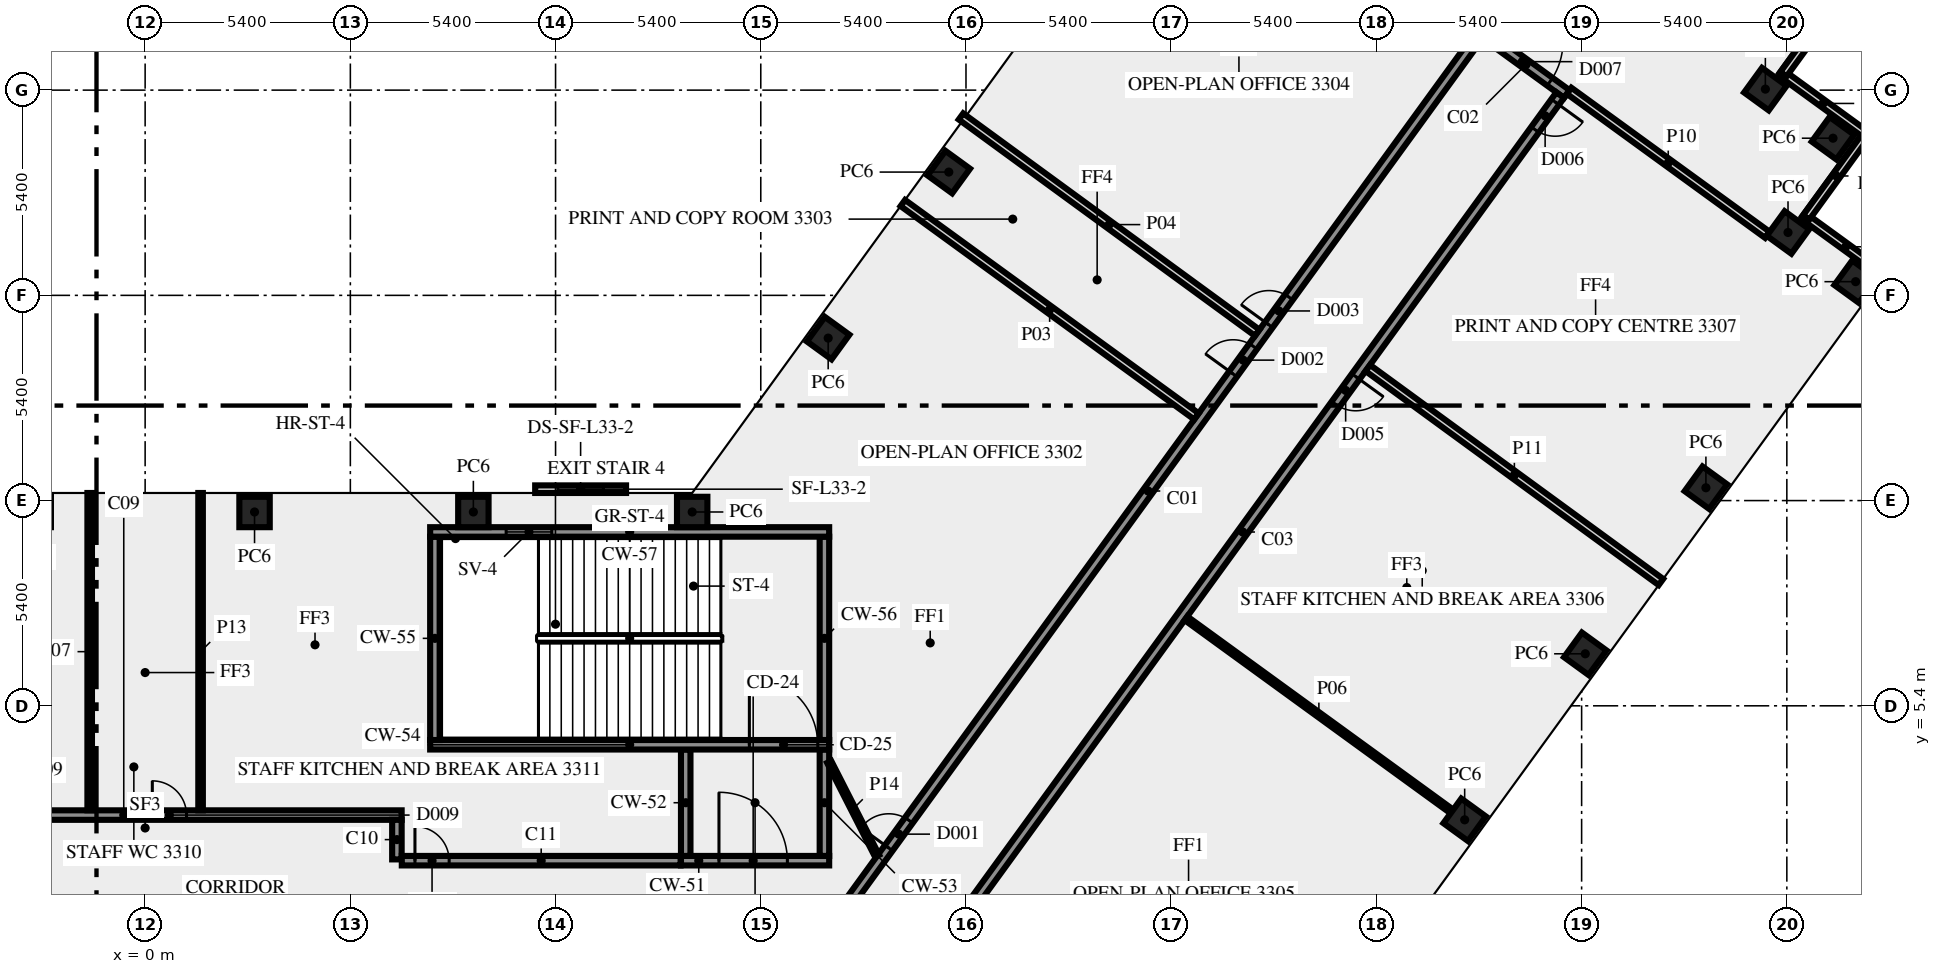
"""IFC4 building model, lengths in metres.
Left out: names, types, materials, properties, quantities, classifications, styles, units other than length and angle.
Written with IfcOpenShell. Run it as: python <this file> out.ifc"""

import sys

from ifc_helpers import new_model, si_unit, direction, frame, frame_2d, origin, origin_2d, place, context, subcontext, project, spatial, rectangle, extrude, element, fill, save


model = new_model("IFC4")
c1 = context("Model", 3, precision=1e-05, world=origin(), true_north=direction((0.0, 1.0)))
c2 = subcontext(c1, "Body", "Model", "MODEL_VIEW")
j1 = project(units=[si_unit("LENGTHUNIT", "METRE"), si_unit("PLANEANGLEUNIT", "RADIAN")], contexts=[c1])
p1 = place(None, origin())
s1 = spatial("IfcSite", under=j1, at=p1, CompositionType="ELEMENT")
p2 = place(p1, origin())
s2 = spatial("IfcBuilding", under=s1, at=p2, CompositionType="ELEMENT")
p3 = place(p2, frame((0.0, 0.0, 144.0)))
s3 = spatial("IfcBuildingStorey", under=s2, at=p3, CompositionType="ELEMENT", Elevation=144.0)
for number, where, z_axis, x_axis in (
    (1, (34.722, 2.4, 0.0), (0.0, 0.0, 1.0), (0.588, 0.809, 0.0)),
    (2, (37.896, 6.769, 0.0), (0.0, 0.0, 1.0), (0.588, 0.809, 0.0)),
    (3, (41.07, 11.137, 0.0), (0.0, 0.0, 1.0), (0.588, 0.809, 0.0)),
    (4, (45.01, 16.56, 0.0), (0.0, 0.0, 1.0), (0.588, 0.809, 0.0)),
    (5, (43.231, 17.854, 0.0), (0.0, 0.0, 1.0), (0.588, 0.809, 0.0)),
    (6, (44.415, 20.335, 0.0), (0.0, 0.0, 1.0), (0.588, 0.809, 0.0)),
    (7, (42.635, 21.626, 0.0), (0.0, 0.0, 1.0), (-0.809, 0.588, 0.0)),
    (8, (21.147, 19.444, 0.0), (0.0, 0.0, 1.0), (-0.588, -0.809, 0.0)),
    (9, (17.974, 15.075, 0.0), (0.0, 0.0, 1.0), (-0.588, -0.809, 0.0)),
    (10, (14.395, 10.5, 0.0), (0.0, 0.0, 1.0), (-1.0, 0.0, 0.0)),
    (11, (8.637, 10.5, 0.0), (0.0, 0.0, 1.0), (-1.0, 0.0, 0.0)),
    (12, (2.879, 10.5, 0.0), (0.0, 0.0, 1.0), (-1.0, 0.0, 0.0)),
):
    element("IfcColumn", number, at=place(p3, frame(where, z_axis=z_axis, x_axis=x_axis)), inside=s3, PredefinedType="COLUMN", context=c2, shape_type="SweptSolid", body=[
        extrude(rectangle(XDim=0.8, YDim=0.8, at=origin_2d()), origin(), (0.0, 0.0, 1.0), 3.65),
    ])
for number, where, z_axis, x_axis in (
    (13, (45.842, 16.685, 0.0), (0.0, 0.0, 1.0), (-0.809, 0.588, 0.0)),
    (14, (43.709, 18.249, 0.0), (0.0, 0.0, 1.0), (0.588, 0.809, 0.0)),
    (15, (45.245, 20.456, 0.0), (0.0, 0.0, 1.0), (-0.809, 0.588, 0.0)),
    (16, (43.113, 22.02, 0.0), (0.0, 0.0, 1.0), (0.588, 0.809, 0.0)),
):
    element("IfcWall", number, at=place(p3, frame(where, z_axis=z_axis, x_axis=x_axis)), inside=s3, PredefinedType="SOLIDWALL", context=c2, shape_type="SweptSolid", body=[
        extrude(rectangle(XDim=2.7, YDim=0.2, at=frame_2d((1.35, 0.0))), origin(), (0.0, 0.0, 1.0), 3.65),
    ])
p4 = place(p3, frame((12.655, 11.1, 0.0), z_axis=(0.0, 0.0, 1.0), x_axis=(-1.0, 0.0, 0.0)))
e17 = element("IfcWall", 17, at=p4, inside=s3, PredefinedType="SOLIDWALL", context=c2, shape_type="SweptSolid", body=[
    extrude(rectangle(XDim=2.392, YDim=0.2, at=frame_2d((1.196, 0.0))), origin(), (0.0, 0.0, 1.0), 3.65),
])
p5 = place(p4, frame((0.596, 0.0, 1.0)))
e18 = element("IfcOpeningElement", 18, at=p5, cuts=e17, PredefinedType="OPENING", context=c2, shape_type="SweptSolid", body=[
    extrude(rectangle(XDim=1.2, YDim=1.2, at=frame_2d((0.6, 0.6))), frame((0.0, 0.11, 0.0), z_axis=(0.0, -1.0, 0.0), x_axis=(1.0, 0.0, 0.0)), (0.0, 0.0, 1.0), 0.22),
])
p6 = place(p3, frame((14.1, 1.325, 0.0), z_axis=(0.0, 0.0, 1.0), x_axis=(1.0, 0.0, 0.0)))
e19 = element("IfcWall", 19, at=p6, inside=s3, PredefinedType="SHEAR", context=c2, shape_type="SweptSolid", body=[
    extrude(rectangle(XDim=3.9, YDim=0.25, at=frame_2d((1.95, 0.0))), origin(), (0.0, 0.0, 1.0), 3.65),
])
p7 = place(p6, frame((1.0, 0.0, 0.0)))
e20 = element("IfcOpeningElement", 20, at=p7, cuts=e19, PredefinedType="OPENING", context=c2, shape_type="SweptSolid", body=[
    extrude(rectangle(XDim=1.8, YDim=2.1, at=frame_2d((0.9, 1.05))), frame((0.0, 0.135, 0.0), z_axis=(0.0, -1.0, 0.0), x_axis=(1.0, 0.0, 0.0)), (0.0, 0.0, 1.0), 0.27),
])
for number, where, z_axis, x_axis in (
    (21, (14.225, 1.45, 0.0), (0.0, 0.0, 1.0), (0.0, 1.0, 0.0)),
    (22, (17.875, 1.45, 0.0), (0.0, 0.0, 1.0), (0.0, 1.0, 0.0)),
):
    element("IfcWall", number, at=place(p3, frame(where, z_axis=z_axis, x_axis=x_axis)), inside=s3, PredefinedType="SHEAR", context=c2, shape_type="SweptSolid", body=[
        extrude(rectangle(XDim=2.8, YDim=0.25, at=frame_2d((1.4, 0.0))), origin(), (0.0, 0.0, 1.0), 3.65),
    ])
p8 = place(p3, frame((7.5, 4.375, 0.0), z_axis=(0.0, 0.0, 1.0), x_axis=(1.0, 0.0, 0.0)))
e23 = element("IfcWall", 23, at=p8, inside=s3, PredefinedType="SHEAR", context=c2, shape_type="SweptSolid", body=[
    extrude(rectangle(XDim=10.5, YDim=0.25, at=frame_2d((5.25, 0.0))), origin(), (0.0, 0.0, 1.0), 3.65),
])
p9 = place(p8, frame((8.4, 0.0, 0.0)))
e24 = element("IfcOpeningElement", 24, at=p9, cuts=e23, PredefinedType="OPENING", context=c2, shape_type="SweptSolid", body=[
    extrude(rectangle(XDim=1.8, YDim=2.1, at=frame_2d((0.9, 1.05))), frame((0.0, 0.135, 0.0), z_axis=(0.0, -1.0, 0.0), x_axis=(1.0, 0.0, 0.0)), (0.0, 0.0, 1.0), 0.27),
])
for number, where, z_axis, x_axis in (
    (25, (7.625, 4.5, 0.0), (0.0, 0.0, 1.0), (0.0, 1.0, 0.0)),
    (26, (17.875, 4.5, 0.0), (0.0, 0.0, 1.0), (0.0, 1.0, 0.0)),
):
    element("IfcWall", number, at=place(p3, frame(where, z_axis=z_axis, x_axis=x_axis)), inside=s3, PredefinedType="SHEAR", context=c2, shape_type="SweptSolid", body=[
        extrude(rectangle(XDim=5.35, YDim=0.25, at=frame_2d((2.675, 0.0))), origin(), (0.0, 0.0, 1.0), 3.65),
    ])
p10 = place(p3, frame((7.5, 9.975, 0.0), z_axis=(0.0, 0.0, 1.0), x_axis=(1.0, 0.0, 0.0)))
e27 = element("IfcWall", 27, at=p10, inside=s3, PredefinedType="SHEAR", context=c2, shape_type="SweptSolid", body=[
    extrude(rectangle(XDim=10.5, YDim=0.25, at=frame_2d((5.25, 0.0))), origin(), (0.0, 0.0, 1.0), 3.65),
])
p11 = place(p10, frame((2.0, 0.0, 1.0)))
e28 = element("IfcOpeningElement", 28, at=p11, cuts=e27, PredefinedType="OPENING", context=c2, shape_type="SweptSolid", body=[
    extrude(rectangle(XDim=1.2, YDim=1.2, at=frame_2d((0.6, 0.6))), frame((0.0, 0.135, 0.0), z_axis=(0.0, -1.0, 0.0), x_axis=(1.0, 0.0, 0.0)), (0.0, 0.0, 1.0), 0.27),
])
p12 = place(p3, frame((17.545, -1.125, 0.0), z_axis=(0.0, 0.0, 1.0), x_axis=(0.587786330937, 0.809016210693, 0.0)))
e29 = element("IfcWall", 29, at=p12, inside=s3, PredefinedType="SOLIDWALL", context=c2, shape_type="SweptSolid", body=[
    extrude(rectangle(XDim=30.103, YDim=0.25, at=frame_2d((15.052, 0.0))), origin(), (0.0, 0.0, 1.0), 3.65),
])
p13 = place(p12, frame((3.441, 0.0, 0.0)))
e30 = element("IfcOpeningElement", 30, at=p13, cuts=e29, PredefinedType="OPENING", context=c2, shape_type="SweptSolid", body=[
    extrude(rectangle(XDim=0.9, YDim=2.1, at=frame_2d((0.45, 1.05))), frame((0.0, 0.135, 0.0), z_axis=(0.0, -1.0, 0.0), x_axis=(1.0, 0.0, 0.0)), (0.0, 0.0, 1.0), 0.27),
])
p14 = place(p12, frame((20.457, 0.0, 0.0)))
e31 = element("IfcOpeningElement", 31, at=p14, cuts=e29, PredefinedType="OPENING", context=c2, shape_type="SweptSolid", body=[
    extrude(rectangle(XDim=0.9, YDim=2.1, at=frame_2d((0.45, 1.05))), frame((0.0, 0.135, 0.0), z_axis=(0.0, -1.0, 0.0), x_axis=(1.0, 0.0, 0.0)), (0.0, 0.0, 1.0), 0.27),
])
p15 = place(p12, frame((18.858, 0.0, 0.0)))
e32 = element("IfcOpeningElement", 32, at=p15, cuts=e29, PredefinedType="OPENING", context=c2, shape_type="SweptSolid", body=[
    extrude(rectangle(XDim=0.9, YDim=2.1, at=frame_2d((0.45, 1.05))), frame((0.0, 0.135, 0.0), z_axis=(0.0, -1.0, 0.0), x_axis=(1.0, 0.0, 0.0)), (0.0, 0.0, 1.0), 0.27),
])
p16 = place(p3, frame((35.267, 23.054, 0.0), z_axis=(0.0, 0.0, 1.0), x_axis=(0.809038743598, -0.587755315891, 0.0)))
e33 = element("IfcWall", 33, at=p16, inside=s3, PredefinedType="SOLIDWALL", context=c2, shape_type="SweptSolid", body=[
    extrude(rectangle(XDim=2.65, YDim=0.25, at=frame_2d((1.325, 0.0))), origin(), (0.0, 0.0, 1.0), 3.65),
])
p17 = place(p16, frame((0.3, 0.0, 0.0)))
e34 = element("IfcOpeningElement", 34, at=p17, cuts=e33, PredefinedType="OPENING", context=c2, shape_type="SweptSolid", body=[
    extrude(rectangle(XDim=1.8, YDim=2.1, at=frame_2d((0.9, 1.05))), frame((0.0, 0.135, 0.0), z_axis=(0.0, -1.0, 0.0), x_axis=(1.0, 0.0, 0.0)), (0.0, 0.0, 1.0), 0.27),
])
p18 = place(p3, frame((37.236, 21.469, 0.0), z_axis=(0.0, 0.0, 1.0), x_axis=(-0.58778344073, -0.809018310549, 0.0)))
e35 = element("IfcWall", 35, at=p18, inside=s3, PredefinedType="SOLIDWALL", context=c2, shape_type="SweptSolid", body=[
    extrude(rectangle(XDim=28.42, YDim=0.25, at=frame_2d((14.21, 0.0))), origin(), (0.0, 0.0, 1.0), 3.65),
])
p19 = place(p18, frame((26.988, 0.0, 0.0)))
e36 = element("IfcOpeningElement", 36, at=p19, cuts=e35, PredefinedType="OPENING", context=c2, shape_type="SweptSolid", body=[
    extrude(rectangle(XDim=0.9, YDim=2.1, at=frame_2d((0.45, 1.05))), frame((0.0, 0.135, 0.0), z_axis=(0.0, -1.0, 0.0), x_axis=(1.0, 0.0, 0.0)), (0.0, 0.0, 1.0), 0.27),
])
p20 = place(p18, frame((0.224, 0.0, 0.0)))
e37 = element("IfcOpeningElement", 37, at=p20, cuts=e35, PredefinedType="OPENING", context=c2, shape_type="SweptSolid", body=[
    extrude(rectangle(XDim=0.9, YDim=2.1, at=frame_2d((0.45, 1.05))), frame((0.0, 0.135, 0.0), z_axis=(0.0, -1.0, 0.0), x_axis=(1.0, 0.0, 0.0)), (0.0, 0.0, 1.0), 0.27),
])
p21 = place(p18, frame((9.155, 0.0, 0.0)))
e38 = element("IfcOpeningElement", 38, at=p21, cuts=e35, PredefinedType="OPENING", context=c2, shape_type="SweptSolid", body=[
    extrude(rectangle(XDim=0.9, YDim=2.1, at=frame_2d((0.45, 1.05))), frame((0.0, 0.135, 0.0), z_axis=(0.0, -1.0, 0.0), x_axis=(1.0, 0.0, 0.0)), (0.0, 0.0, 1.0), 0.27),
])
p22 = place(p3, frame((-4.5, 2.525, 0.0), z_axis=(0.0, 0.0, 1.0), x_axis=(1.0, 0.0, 0.0)))
e39 = element("IfcWall", 39, at=p22, inside=s3, PredefinedType="SOLIDWALL", context=c2, shape_type="SweptSolid", body=[
    extrude(rectangle(XDim=11.25, YDim=0.25, at=frame_2d((5.625, 0.0))), origin(), (0.0, 0.0, 1.0), 3.65),
])
p23 = place(p22, frame((4.689, 0.0, 0.0)))
e40 = element("IfcOpeningElement", 40, at=p23, cuts=e39, PredefinedType="OPENING", context=c2, shape_type="SweptSolid", body=[
    extrude(rectangle(XDim=0.9, YDim=2.1, at=frame_2d((0.45, 1.05))), frame((0.0, 0.135, 0.0), z_axis=(0.0, -1.0, 0.0), x_axis=(1.0, 0.0, 0.0)), (0.0, 0.0, 1.0), 0.27),
])
p24 = place(p3, frame((6.625, 2.4, 0.0), z_axis=(0.0, 0.0, 1.0), x_axis=(0.0, -1.0, 0.0)))
e41 = element("IfcWall", 41, at=p24, inside=s3, PredefinedType="SOLIDWALL", context=c2, shape_type="SweptSolid", body=[
    extrude(rectangle(XDim=1.041, YDim=0.25, at=frame_2d((0.521, 0.0))), origin(), (0.0, 0.0, 1.0), 3.65),
])
p25 = place(p3, frame((6.754, 1.325, 0.0), z_axis=(0.0, 0.0, 1.0), x_axis=(1.0, 0.0, 0.0)))
e42 = element("IfcWall", 42, at=p25, inside=s3, PredefinedType="SOLIDWALL", context=c2, shape_type="SweptSolid", body=[
    extrude(rectangle(XDim=7.336, YDim=0.25, at=frame_2d((3.668, 0.0))), origin(), (0.0, 0.0, 1.0), 3.65),
])
p26 = place(p25, frame((0.346, 0.0, 0.0)))
e43 = element("IfcOpeningElement", 43, at=p26, cuts=e42, PredefinedType="OPENING", context=c2, shape_type="SweptSolid", body=[
    extrude(rectangle(XDim=0.9, YDim=2.1, at=frame_2d((0.45, 1.05))), frame((0.0, 0.135, 0.0), z_axis=(0.0, -1.0, 0.0), x_axis=(1.0, 0.0, 0.0)), (0.0, 0.0, 1.0), 0.27),
])
p27 = place(p3, frame((27.664, 13.016, 0.0), z_axis=(0.0, 0.0, 1.0), x_axis=(-0.80900684162, 0.587799226107, 0.0)))
e44 = element("IfcWall", 44, at=p27, inside=s3, PredefinedType="SOLIDWALL", context=c2, shape_type="SweptSolid", body=[
    extrude(rectangle(XDim=9.55, YDim=0.2, at=frame_2d((4.775, 0.0))), origin(), (0.0, 0.0, 1.0), 2.85),
])
p28 = place(p3, frame((21.469, 20.908, 0.0), z_axis=(0.0, 0.0, 1.0), x_axis=(0.807593618158, -0.589739389824, 0.0)))
e45 = element("IfcWall", 45, at=p28, inside=s3, PredefinedType="SOLIDWALL", context=c2, shape_type="SweptSolid", body=[
    extrude(rectangle(XDim=9.651, YDim=0.2, at=frame_2d((4.826, 0.0))), origin(), (0.0, 0.0, 1.0), 2.85),
])
p29 = place(p3, frame((34.383, 2.622, 0.0), z_axis=(0.0, 0.0, 1.0), x_axis=(-0.809060825193, 0.587724919617, 0.0)))
e46 = element("IfcWall", 46, at=p29, inside=s3, PredefinedType="PARTITIONING", context=c2, shape_type="SweptSolid", body=[
    extrude(rectangle(XDim=8.645, YDim=0.12, at=frame_2d((4.322, 0.0))), origin(), (0.0, 0.0, 1.0), 3.65),
])
p30 = place(p3, frame((-1.459, 2.65, 0.0), z_axis=(0.0, 0.0, 1.0), x_axis=(0.0, 1.0, 0.0)))
e47 = element("IfcWall", 47, at=p30, inside=s3, PredefinedType="PARTITIONING", context=c2, shape_type="SweptSolid", body=[
    extrude(rectangle(XDim=8.35, YDim=0.12, at=frame_2d((4.175, 0.0))), origin(), (0.0, 0.0, 1.0), 2.85),
])
p31 = place(p3, frame((42.686, 17.794, 0.0), z_axis=(0.0, 0.0, 1.0), x_axis=(-0.809017755079, 0.587784205272, 0.0)))
e48 = element("IfcWall", 48, at=p31, inside=s3, PredefinedType="SOLIDWALL", context=c2, shape_type="SweptSolid", body=[
    extrude(rectangle(XDim=6.445, YDim=0.2, at=frame_2d((3.222, 0.0))), origin(), (0.0, 0.0, 1.0), 3.65),
])
p32 = place(p3, frame((32.174, 14.288, 0.0), z_axis=(0.0, 0.0, 1.0), x_axis=(0.807664588563, -0.589642190131, 0.0)))
e49 = element("IfcWall", 49, at=p32, inside=s3, PredefinedType="SOLIDWALL", context=c2, shape_type="SweptSolid", body=[
    extrude(rectangle(XDim=9.55, YDim=0.2, at=frame_2d((4.775, 0.0))), origin(), (0.0, 0.0, 1.0), 2.85),
])
p33 = place(p3, frame((1.459, 11.0, 0.0), z_axis=(0.0, 0.0, 1.0), x_axis=(0.0, -1.0, 0.0)))
e50 = element("IfcWall", 50, at=p33, inside=s3, PredefinedType="PARTITIONING", context=c2, shape_type="SweptSolid", body=[
    extrude(rectangle(XDim=8.35, YDim=0.12, at=frame_2d((4.175, 0.0))), origin(), (0.0, 0.0, 1.0), 2.85),
])
p34 = place(p3, frame((18.0, 3.925, 0.0), z_axis=(0.0, 0.0, 1.0), x_axis=(0.453950796792, -0.891026752736, 0.0)))
e51 = element("IfcWall", 51, at=p34, inside=s3, PredefinedType="PARTITIONING", context=c2, shape_type="SweptSolid", body=[
    extrude(rectangle(XDim=2.778, YDim=0.12, at=frame_2d((1.389, 0.0))), origin(), (0.0, 0.0, 1.0), 3.65),
])
p35 = place(p5, origin())
e52 = element("IfcWindow", 52, at=p35, inside=s3, PartitioningType="SINGLE_PANEL", PredefinedType="WINDOW", context=c2, shape_type="SweptSolid", body=[
    extrude(rectangle(XDim=1.2, YDim=1.2, at=frame_2d((0.6, 0.6))), frame((0.0, 0.03, 0.0), z_axis=(0.0, -1.0, 0.0), x_axis=(1.0, 0.0, 0.0)), (0.0, 0.0, 1.0), 0.06),
])
fill(e18, e52)
p36 = place(p7, origin())
e53 = element("IfcDoor", 53, at=p36, inside=s3, OperationType="DOUBLE_DOOR_SINGLE_SWING", PredefinedType="DOOR", context=c2, shape_type="SweptSolid", body=[
    extrude(rectangle(XDim=1.8, YDim=2.1, at=frame_2d((0.9, 1.05))), frame((0.0, 0.025, 0.0), z_axis=(0.0, -1.0, 0.0), x_axis=(1.0, 0.0, 0.0)), (0.0, 0.0, 1.0), 0.05),
])
fill(e20, e53)
p37 = place(p9, origin())
e54 = element("IfcDoor", 54, at=p37, inside=s3, OperationType="DOUBLE_DOOR_SINGLE_SWING", PredefinedType="DOOR", context=c2, shape_type="SweptSolid", body=[
    extrude(rectangle(XDim=1.8, YDim=2.1, at=frame_2d((0.9, 1.05))), frame((0.0, 0.025, 0.0), z_axis=(0.0, -1.0, 0.0), x_axis=(1.0, 0.0, 0.0)), (0.0, 0.0, 1.0), 0.05),
])
fill(e24, e54)
p38 = place(p11, origin())
e55 = element("IfcWindow", 55, at=p38, inside=s3, PartitioningType="SINGLE_PANEL", PredefinedType="WINDOW", context=c2, shape_type="SweptSolid", body=[
    extrude(rectangle(XDim=1.2, YDim=1.2, at=frame_2d((0.6, 0.6))), frame((0.0, 0.03, 0.0), z_axis=(0.0, -1.0, 0.0), x_axis=(1.0, 0.0, 0.0)), (0.0, 0.0, 1.0), 0.06),
])
fill(e28, e55)
p39 = place(p13, origin())
e56 = element("IfcDoor", 56, at=p39, inside=s3, OperationType="SINGLE_SWING_LEFT", PredefinedType="DOOR", context=c2, shape_type="SweptSolid", body=[
    extrude(rectangle(XDim=0.9, YDim=2.1, at=frame_2d((0.45, 1.05))), frame((0.0, 0.025, 0.0), z_axis=(0.0, -1.0, 0.0), x_axis=(1.0, 0.0, 0.0)), (0.0, 0.0, 1.0), 0.05),
])
fill(e30, e56)
p40 = place(p14, origin())
e57 = element("IfcDoor", 57, at=p40, inside=s3, OperationType="SINGLE_SWING_LEFT", PredefinedType="DOOR", context=c2, shape_type="SweptSolid", body=[
    extrude(rectangle(XDim=0.9, YDim=2.1, at=frame_2d((0.45, 1.05))), frame((0.0, 0.025, 0.0), z_axis=(0.0, -1.0, 0.0), x_axis=(1.0, 0.0, 0.0)), (0.0, 0.0, 1.0), 0.05),
])
fill(e31, e57)
p41 = place(p15, origin())
e58 = element("IfcDoor", 58, at=p41, inside=s3, OperationType="SINGLE_SWING_RIGHT", PredefinedType="DOOR", context=c2, shape_type="SweptSolid", body=[
    extrude(rectangle(XDim=0.9, YDim=2.1, at=frame_2d((0.45, 1.05))), frame((0.0, 0.025, 0.0), z_axis=(0.0, -1.0, 0.0), x_axis=(1.0, 0.0, 0.0)), (0.0, 0.0, 1.0), 0.05),
])
fill(e32, e58)
p42 = place(p20, origin())
e59 = element("IfcDoor", 59, at=p42, inside=s3, OperationType="SINGLE_SWING_LEFT", PredefinedType="DOOR", context=c2, shape_type="SweptSolid", body=[
    extrude(rectangle(XDim=0.9, YDim=2.1, at=frame_2d((0.45, 1.05))), frame((0.0, 0.025, 0.0), z_axis=(0.0, -1.0, 0.0), x_axis=(1.0, 0.0, 0.0)), (0.0, 0.0, 1.0), 0.05),
])
fill(e37, e59)
p43 = place(p17, origin())
e60 = element("IfcDoor", 60, at=p43, inside=s3, OperationType="DOUBLE_DOOR_SINGLE_SWING", PredefinedType="DOOR", context=c2, shape_type="SweptSolid", body=[
    extrude(rectangle(XDim=1.8, YDim=2.1, at=frame_2d((0.9, 1.05))), frame((0.0, 0.025, 0.0), z_axis=(0.0, -1.0, 0.0), x_axis=(1.0, 0.0, 0.0)), (0.0, 0.0, 1.0), 0.05),
])
fill(e34, e60)
p44 = place(p21, origin())
e61 = element("IfcDoor", 61, at=p44, inside=s3, OperationType="SINGLE_SWING_LEFT", PredefinedType="DOOR", context=c2, shape_type="SweptSolid", body=[
    extrude(rectangle(XDim=0.9, YDim=2.1, at=frame_2d((0.45, 1.05))), frame((0.0, 0.025, 0.0), z_axis=(0.0, -1.0, 0.0), x_axis=(1.0, 0.0, 0.0)), (0.0, 0.0, 1.0), 0.05),
])
fill(e38, e61)
p45 = place(p26, origin())
e62 = element("IfcDoor", 62, at=p45, inside=s3, OperationType="SINGLE_SWING_LEFT", PredefinedType="DOOR", context=c2, shape_type="SweptSolid", body=[
    extrude(rectangle(XDim=0.9, YDim=2.1, at=frame_2d((0.45, 1.05))), frame((0.0, 0.025, 0.0), z_axis=(0.0, -1.0, 0.0), x_axis=(1.0, 0.0, 0.0)), (0.0, 0.0, 1.0), 0.05),
])
fill(e43, e62)
p46 = place(p23, origin())
e63 = element("IfcDoor", 63, at=p46, inside=s3, OperationType="SINGLE_SWING_RIGHT", PredefinedType="DOOR", context=c2, shape_type="SweptSolid", body=[
    extrude(rectangle(XDim=0.9, YDim=2.1, at=frame_2d((0.45, 1.05))), frame((0.0, 0.025, 0.0), z_axis=(0.0, -1.0, 0.0), x_axis=(1.0, 0.0, 0.0)), (0.0, 0.0, 1.0), 0.05),
])
fill(e40, e63)
save(model, sys.argv[1])
